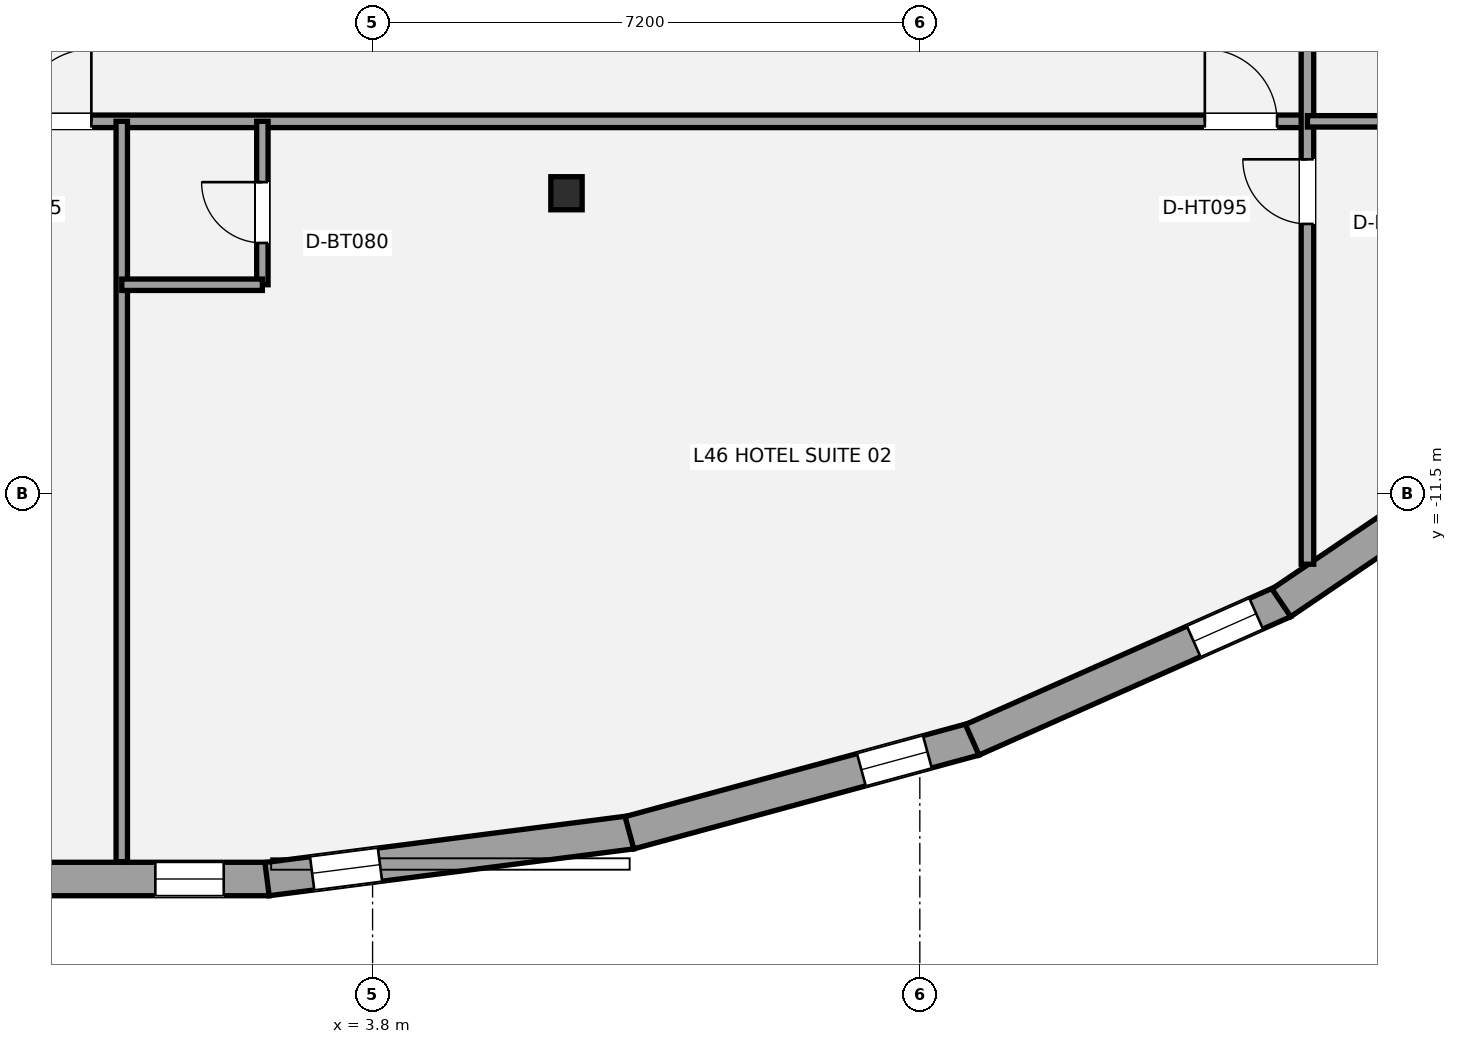
"""IFC4 building model, lengths in metres.
Left out: names, types, materials, properties, quantities, classifications, styles, units other than length and angle.
Written with IfcOpenShell. Run it as: python <this file> out.ifc"""

import sys

from ifc_helpers import new_model, si_unit, direction, frame, frame_2d, origin, origin_2d, place, context, subcontext, project, spatial, rectangle, i_section, extrude, element, fill, save


model = new_model("IFC4")
c1 = context("Model", 3, precision=1e-05, world=origin(), true_north=direction((0.0, 1.0)))
c2 = subcontext(c1, "Body", "Model", "MODEL_VIEW")
j1 = project(units=[si_unit("LENGTHUNIT", "METRE"), si_unit("PLANEANGLEUNIT", "RADIAN")], contexts=[c1])
p1 = place(None, origin())
s1 = spatial("IfcSite", under=j1, at=p1, CompositionType="ELEMENT")
p2 = place(p1, origin())
s2 = spatial("IfcBuilding", under=s1, at=p2, CompositionType="ELEMENT")
p3 = place(p2, frame((0.0, 0.0, 169.4)))
s3 = spatial("IfcBuildingStorey", under=s2, at=p3, CompositionType="ELEMENT", Elevation=169.4)
p4 = place(p3, frame((6.351, -7.546, 0.0), z_axis=(0.0, 0.0, 1.0), x_axis=(1.0, 0.0, 0.0)))
e1 = element("IfcColumn", 1, at=p4, inside=s3, PredefinedType="COLUMN", context=c2, shape_type="SweptSolid", body=[
    extrude(i_section(OverallWidth=0.412, OverallDepth=0.435, WebThickness=0.036, FlangeThickness=0.057, at=origin_2d()), origin(), (0.0, 0.0, 1.0), 3.2),
])
p5 = place(p3, frame((2.439, -16.568, 0.0), z_axis=(0.0, 0.0, 1.0), x_axis=(-1.0, 0.0, 0.0)))
e2 = element("IfcWall", 2, at=p5, inside=s3, PredefinedType="STANDARD", context=c2, shape_type="SweptSolid", body=[
    extrude(rectangle(XDim=4.878, YDim=0.44, at=frame_2d((2.439, 0.0))), origin(), (0.0, 0.0, 1.0), 2.315),
])
p6 = place(p5, frame((0.598, 0.0, 0.58)))
e3 = element("IfcOpeningElement", 3, at=p6, cuts=e2, PredefinedType="OPENING", context=c2, shape_type="SweptSolid", body=[
    extrude(rectangle(XDim=0.9, YDim=1.35, at=frame_2d((0.45, 0.675))), frame((0.0, 0.23, 0.0), z_axis=(0.0, -1.0, 0.0), x_axis=(1.0, 0.0, 0.0)), (0.0, 0.0, 1.0), 0.46),
])
p7 = place(p3, frame((7.209, -15.954, 0.0), z_axis=(0.0, 0.0, 1.0), x_axis=(-0.991852910824, -0.127388395426, 0.0)))
e4 = element("IfcWall", 4, at=p7, inside=s3, PredefinedType="STANDARD", context=c2, shape_type="SweptSolid", body=[
    extrude(rectangle(XDim=4.837, YDim=0.44, at=frame_2d((2.418, 0.0))), origin(), (0.0, 0.0, 1.0), 2.315),
])
p8 = place(p7, frame((3.339, 0.0, 0.58)))
e5 = element("IfcOpeningElement", 5, at=p8, cuts=e4, PredefinedType="OPENING", context=c2, shape_type="SweptSolid", body=[
    extrude(rectangle(XDim=0.9, YDim=1.35, at=frame_2d((0.45, 0.675))), frame((0.0, 0.23, 0.0), z_axis=(0.0, -1.0, 0.0), x_axis=(1.0, 0.0, 0.0)), (0.0, 0.0, 1.0), 0.46),
])
p9 = place(p3, frame((11.721, -14.726, 0.0), z_axis=(0.0, 0.0, 1.0), x_axis=(-0.965037424263, -0.262112132058, 0.0)))
e6 = element("IfcWall", 6, at=p9, inside=s3, PredefinedType="STANDARD", context=c2, shape_type="SweptSolid", body=[
    extrude(rectangle(XDim=4.707, YDim=0.44, at=frame_2d((2.353, 0.0))), origin(), (0.0, 0.0, 1.0), 2.315),
])
p10 = place(p9, frame((0.644, 0.0, 0.58)))
e7 = element("IfcOpeningElement", 7, at=p10, cuts=e6, PredefinedType="OPENING", context=c2, shape_type="SweptSolid", body=[
    extrude(rectangle(XDim=0.9, YDim=1.35, at=frame_2d((0.45, 0.675))), frame((0.0, 0.23, 0.0), z_axis=(0.0, -1.0, 0.0), x_axis=(1.0, 0.0, 0.0)), (0.0, 0.0, 1.0), 0.46),
])
p11 = place(p3, frame((15.791, -12.916, 0.0), z_axis=(0.0, 0.0, 1.0), x_axis=(-0.913907994914, -0.405921392431, 0.0)))
e8 = element("IfcWall", 8, at=p11, inside=s3, PredefinedType="STANDARD", context=c2, shape_type="SweptSolid", body=[
    extrude(rectangle(XDim=4.487, YDim=0.44, at=frame_2d((2.244, 0.0))), origin(), (0.0, 0.0, 1.0), 2.315),
])
p12 = place(p11, frame((0.399, 0.0, 0.58)))
e9 = element("IfcOpeningElement", 9, at=p12, cuts=e8, PredefinedType="OPENING", context=c2, shape_type="SweptSolid", body=[
    extrude(rectangle(XDim=0.9, YDim=1.35, at=frame_2d((0.45, 0.675))), frame((0.0, 0.23, 0.0), z_axis=(0.0, -1.0, 0.0), x_axis=(1.0, 0.0, 0.0)), (0.0, 0.0, 1.0), 0.46),
])
p13 = place(p3, frame((19.227, -10.583, 0.0), z_axis=(0.0, 0.0, 1.0), x_axis=(-0.827760762475, -0.561081206338, 0.0)))
e10 = element("IfcWall", 10, at=p13, inside=s3, PredefinedType="STANDARD", context=c2, shape_type="SweptSolid", body=[
    extrude(rectangle(XDim=4.192, YDim=0.44, at=frame_2d((2.096, 0.0))), origin(), (0.0, 0.0, 1.0), 2.319),
])
p14 = place(p13, frame((0.549, 0.0, 0.58)))
e11 = element("IfcOpeningElement", 11, at=p14, cuts=e10, PredefinedType="OPENING", context=c2, shape_type="SweptSolid", body=[
    extrude(rectangle(XDim=0.9, YDim=1.35, at=frame_2d((0.45, 0.675))), frame((0.0, 0.23, 0.0), z_axis=(0.0, -1.0, 0.0), x_axis=(1.0, 0.0, 0.0)), (0.0, 0.0, 1.0), 0.46),
])
p15 = place(p3, frame((-15.55, -6.6, 0.0), z_axis=(0.0, 0.0, 1.0), x_axis=(1.0, 0.0, 0.0)))
e12 = element("IfcWall", 12, at=p15, inside=s3, PredefinedType="PARTITIONING", context=c2, shape_type="SweptSolid", body=[
    extrude(rectangle(XDim=31.65, YDim=0.165, at=frame_2d((15.825, 0.0))), origin(), (0.0, 0.0, 1.0), 2.398),
])
p16 = place(p15, frame((14.7, 0.0, 0.0)))
e13 = element("IfcOpeningElement", 13, at=p16, cuts=e12, PredefinedType="OPENING", context=c2, shape_type="SweptSolid", body=[
    extrude(rectangle(XDim=0.95, YDim=2.15, at=frame_2d((0.475, 1.075))), frame((0.0, 0.093, 0.0), z_axis=(0.0, -1.0, 0.0), x_axis=(1.0, 0.0, 0.0)), (0.0, 0.0, 1.0), 0.185),
])
p17 = place(p15, frame((30.3, 0.0, 0.0)))
e14 = element("IfcOpeningElement", 14, at=p17, cuts=e12, PredefinedType="OPENING", context=c2, shape_type="SweptSolid", body=[
    extrude(rectangle(XDim=0.95, YDim=2.15, at=frame_2d((0.475, 1.075))), frame((0.0, 0.093, 0.0), z_axis=(0.0, -1.0, 0.0), x_axis=(1.0, 0.0, 0.0)), (0.0, 0.0, 1.0), 0.185),
])
p18 = place(p3, frame((16.1, -12.427, 0.0), z_axis=(0.0, 0.0, 1.0), x_axis=(0.0, 1.0, 0.0)))
e15 = element("IfcWall", 15, at=p18, inside=s3, PredefinedType="PARTITIONING", context=c2, shape_type="SweptSolid", body=[
    extrude(rectangle(XDim=19.977, YDim=0.165, at=frame_2d((9.988, 0.0))), origin(), (0.0, 0.0, 1.0), 2.473),
])
p19 = place(p18, frame((4.477, 0.0, 0.0)))
e16 = element("IfcOpeningElement", 16, at=p19, cuts=e15, PredefinedType="OPENING", context=c2, shape_type="SweptSolid", body=[
    extrude(rectangle(XDim=0.85, YDim=2.1, at=frame_2d((0.425, 1.05))), frame((0.0, 0.093, 0.0), z_axis=(0.0, -1.0, 0.0), x_axis=(1.0, 0.0, 0.0)), (0.0, 0.0, 1.0), 0.185),
])
p20 = place(p18, frame((8.367, 0.0, 0.0)))
e17 = element("IfcOpeningElement", 17, at=p20, cuts=e15, PredefinedType="OPENING", context=c2, shape_type="SweptSolid", body=[
    extrude(rectangle(XDim=1.0, YDim=2.15, at=frame_2d((0.5, 1.075))), frame((0.0, 0.093, 0.0), z_axis=(0.0, -1.0, 0.0), x_axis=(1.0, 0.0, 0.0)), (0.0, 0.0, 1.0), 0.185),
])
p21 = place(p18, frame((13.027, 0.0, 0.0)))
e18 = element("IfcOpeningElement", 18, at=p21, cuts=e15, PredefinedType="OPENING", context=c2, shape_type="SweptSolid", body=[
    extrude(rectangle(XDim=1.0, YDim=2.15, at=frame_2d((0.5, 1.075))), frame((0.0, 0.093, 0.0), z_axis=(0.0, -1.0, 0.0), x_axis=(1.0, 0.0, 0.0)), (0.0, 0.0, 1.0), 0.185),
])
p22 = place(p18, frame((17.302, 0.0, 0.0)))
e19 = element("IfcOpeningElement", 19, at=p22, cuts=e15, PredefinedType="OPENING", context=c2, shape_type="SweptSolid", body=[
    extrude(rectangle(XDim=1.0, YDim=2.15, at=frame_2d((0.5, 1.075))), frame((0.0, 0.093, 0.0), z_axis=(0.0, -1.0, 0.0), x_axis=(1.0, 0.0, 0.0)), (0.0, 0.0, 1.0), 0.185),
])
p23 = place(p3, frame((16.1, -6.6, 0.0), z_axis=(0.0, 0.0, 1.0), x_axis=(1.0, 0.0, 0.0)))
e20 = element("IfcWall", 20, at=p23, inside=s3, PredefinedType="PLUMBINGWALL", context=c2, shape_type="SweptSolid", body=[
    extrude(rectangle(XDim=6.235, YDim=0.15, at=frame_2d((3.117, 0.0))), origin(), (0.0, 0.0, 1.0), 2.473),
])
p24 = place(p3, frame((0.5, -16.34, 0.0), z_axis=(0.0, 0.0, 1.0), x_axis=(0.0, 1.0, 0.0)))
e21 = element("IfcWall", 21, at=p24, inside=s3, PredefinedType="PLUMBINGWALL", context=c2, shape_type="SweptSolid", body=[
    extrude(rectangle(XDim=9.74, YDim=0.15, at=frame_2d((4.87, 0.0))), origin(), (0.0, 0.0, 1.0), 2.473),
])
p25 = place(p3, frame((2.35, -8.75, 0.0), z_axis=(0.0, 0.0, 1.0), x_axis=(0.0, 1.0, 0.0)))
e22 = element("IfcWall", 22, at=p25, inside=s3, PredefinedType="PLUMBINGWALL", context=c2, shape_type="SweptSolid", body=[
    extrude(rectangle(XDim=2.15, YDim=0.15, at=frame_2d((1.075, 0.0))), origin(), (0.0, 0.0, 1.0), 2.473),
])
p26 = place(p25, frame((0.55, 0.0, 0.0)))
e23 = element("IfcOpeningElement", 23, at=p26, cuts=e22, PredefinedType="OPENING", context=c2, shape_type="SweptSolid", body=[
    extrude(rectangle(XDim=0.8, YDim=2.1, at=frame_2d((0.4, 1.05))), frame((0.0, 0.085, 0.0), z_axis=(0.0, -1.0, 0.0), x_axis=(1.0, 0.0, 0.0)), (0.0, 0.0, 1.0), 0.17),
])
p27 = place(p3, frame((0.5, -8.75, 0.0), z_axis=(0.0, 0.0, 1.0), x_axis=(1.0, 0.0, 0.0)))
e24 = element("IfcWall", 24, at=p27, inside=s3, PredefinedType="PLUMBINGWALL", context=c2, shape_type="SweptSolid", body=[
    extrude(rectangle(XDim=1.85, YDim=0.15, at=frame_2d((0.925, 0.0))), origin(), (0.0, 0.0, 1.0), 2.473),
])
p28 = place(p6, origin())
e25 = element("IfcWindow", 25, at=p28, inside=s3, PartitioningType="SINGLE_PANEL", PredefinedType="WINDOW", context=c2, shape_type="SweptSolid", body=[
    extrude(rectangle(XDim=0.9, YDim=1.35, at=frame_2d((0.45, 0.675))), frame((0.0, -0.01, 0.0), z_axis=(0.0, -1.0, 0.0), x_axis=(1.0, 0.0, 0.0)), (0.0, 0.0, 1.0), 0.06),
])
fill(e3, e25)
p29 = place(p8, origin())
e26 = element("IfcWindow", 26, at=p29, inside=s3, PartitioningType="SINGLE_PANEL", PredefinedType="WINDOW", context=c2, shape_type="SweptSolid", body=[
    extrude(rectangle(XDim=0.9, YDim=1.35, at=frame_2d((0.45, 0.675))), frame((0.0, -0.01, 0.0), z_axis=(0.0, -1.0, 0.0), x_axis=(1.0, 0.0, 0.0)), (0.0, 0.0, 1.0), 0.06),
])
fill(e5, e26)
p30 = place(p10, origin())
e27 = element("IfcWindow", 27, at=p30, inside=s3, PartitioningType="SINGLE_PANEL", PredefinedType="WINDOW", context=c2, shape_type="SweptSolid", body=[
    extrude(rectangle(XDim=0.9, YDim=1.35, at=frame_2d((0.45, 0.675))), frame((0.0, -0.01, 0.0), z_axis=(0.0, -1.0, 0.0), x_axis=(1.0, 0.0, 0.0)), (0.0, 0.0, 1.0), 0.06),
])
fill(e7, e27)
p31 = place(p12, origin())
e28 = element("IfcWindow", 28, at=p31, inside=s3, PartitioningType="SINGLE_PANEL", PredefinedType="WINDOW", context=c2, shape_type="SweptSolid", body=[
    extrude(rectangle(XDim=0.9, YDim=1.35, at=frame_2d((0.45, 0.675))), frame((0.0, -0.01, 0.0), z_axis=(0.0, -1.0, 0.0), x_axis=(1.0, 0.0, 0.0)), (0.0, 0.0, 1.0), 0.06),
])
fill(e9, e28)
p32 = place(p19, origin())
e29 = element("IfcDoor", 29, at=p32, inside=s3, OperationType="SINGLE_SWING_RIGHT", PredefinedType="DOOR", context=c2, shape_type="SweptSolid", body=[
    extrude(rectangle(XDim=0.85, YDim=2.1, at=frame_2d((0.425, 1.05))), frame((0.0, 0.025, 0.0), z_axis=(0.0, -1.0, 0.0), x_axis=(1.0, 0.0, 0.0)), (0.0, 0.0, 1.0), 0.05),
])
fill(e16, e29)
p33 = place(p16, origin())
e30 = element("IfcDoor", 30, at=p33, inside=s3, OperationType="SINGLE_SWING_RIGHT", PredefinedType="DOOR", context=c2, shape_type="SweptSolid", body=[
    extrude(rectangle(XDim=0.95, YDim=2.15, at=frame_2d((0.475, 1.075))), frame((0.0, 0.025, 0.0), z_axis=(0.0, -1.0, 0.0), x_axis=(1.0, 0.0, 0.0)), (0.0, 0.0, 1.0), 0.05),
])
fill(e13, e30)
p34 = place(p17, origin())
e31 = element("IfcDoor", 31, at=p34, inside=s3, OperationType="SINGLE_SWING_LEFT", PredefinedType="DOOR", context=c2, shape_type="SweptSolid", body=[
    extrude(rectangle(XDim=0.95, YDim=2.15, at=frame_2d((0.475, 1.075))), frame((0.0, 0.025, 0.0), z_axis=(0.0, -1.0, 0.0), x_axis=(1.0, 0.0, 0.0)), (0.0, 0.0, 1.0), 0.05),
])
fill(e14, e31)
p35 = place(p26, origin())
e32 = element("IfcDoor", 32, at=p35, inside=s3, OperationType="SINGLE_SWING_RIGHT", PredefinedType="DOOR", context=c2, shape_type="SweptSolid", body=[
    extrude(rectangle(XDim=0.8, YDim=2.1, at=frame_2d((0.4, 1.05))), frame((0.0, 0.025, 0.0), z_axis=(0.0, -1.0, 0.0), x_axis=(1.0, 0.0, 0.0)), (0.0, 0.0, 1.0), 0.05),
])
fill(e23, e32)
save(model, sys.argv[1])
